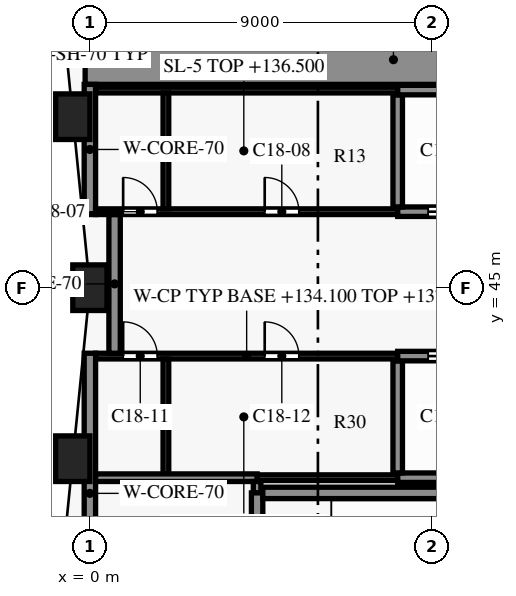
"""IFC4 building model, lengths in metres.
Left out: names, types, materials, properties, quantities, classifications, styles, units other than length and angle.
Written with IfcOpenShell. Run it as: python <this file> out.ifc"""

import sys

from ifc_helpers import new_model, si_unit, direction, frame, frame_2d, origin, origin_2d, place, context, subcontext, project, spatial, rectangle, extrude, element, fill, save


model = new_model("IFC4")
c1 = context("Model", 3, precision=1e-05, world=origin(), true_north=direction((0.0, 1.0)))
c2 = subcontext(c1, "Body", "Model", "MODEL_VIEW")
j1 = project(units=[si_unit("LENGTHUNIT", "METRE"), si_unit("PLANEANGLEUNIT", "RADIAN")], contexts=[c1])
p1 = place(None, origin())
s1 = spatial("IfcSite", under=j1, at=p1, CompositionType="ELEMENT")
p2 = place(p1, origin())
s2 = spatial("IfcBuilding", under=s1, at=p2, CompositionType="ELEMENT")
p3 = place(p2, frame((0.0, 0.0, 134.1)))
s3 = spatial("IfcBuildingStorey", under=s2, at=p3, CompositionType="ELEMENT", Elevation=134.1)
for number, where, z_axis, x_axis in (
    (1, (-0.45, 49.5, 0.0), (0.0, 0.0, 1.0), (0.1, -0.995, 0.0)),
    (2, (0.0, 45.0, 0.0), (0.0, 0.0, 1.0), (0.0, -1.0, 0.0)),
    (3, (-0.45, 40.5, 0.0), (0.0, 0.0, 1.0), (-0.1, -0.995, 0.0)),
):
    element("IfcColumn", number, at=place(p3, frame(where, z_axis=z_axis, x_axis=x_axis)), inside=s3, PredefinedType="COLUMN", context=c2, shape_type="SweptSolid", body=[
        extrude(rectangle(XDim=0.9, YDim=1.2, at=origin_2d()), origin(), (0.0, 0.0, 1.0), 3.8),
    ])
p4 = place(p3, frame((4.55, 39.6, 0.0), z_axis=(0.0, 0.0, 1.0), x_axis=(1.0, 0.0, 0.0)))
e4 = element("IfcWall", 4, at=p4, inside=s3, PredefinedType="SHEAR", context=c2, shape_type="SweptSolid", body=[
    extrude(rectangle(XDim=7.7, YDim=0.3, at=frame_2d((3.85, 0.0))), origin(), (0.0, 0.0, 1.0), 3.5),
])
p5 = place(p3, frame((4.4, 40.0, 0.0), z_axis=(0.0, 0.0, 1.0), x_axis=(1.0, 0.0, 0.0)))
e5 = element("IfcWall", 5, at=p5, inside=s3, PredefinedType="PARTITIONING", context=c2, shape_type="SweptSolid", body=[
    extrude(rectangle(XDim=3.7, YDim=0.15, at=frame_2d((1.85, 0.0))), origin(), (0.0, 0.0, 1.0), 3.35),
])
p6 = place(p3, frame((0.15, 40.0, 0.0), z_axis=(0.0, 0.0, 1.0), x_axis=(1.0, 0.0, 0.0)))
e6 = element("IfcWall", 6, at=p6, inside=s3, PredefinedType="PARTITIONING", context=c2, shape_type="SweptSolid", body=[
    extrude(rectangle(XDim=4.25, YDim=0.2, at=frame_2d((2.125, 0.0))), origin(), (0.0, 0.0, 1.0), 3.35),
])
p7 = place(p3, frame((8.1, 40.0, 0.0), z_axis=(0.0, 0.0, 1.0), x_axis=(1.0, 0.0, 0.0)))
e7 = element("IfcWall", 7, at=p7, inside=s3, PredefinedType="SHEAR", context=c2, shape_type="SweptSolid", body=[
    extrude(rectangle(XDim=13.5, YDim=0.25, at=frame_2d((6.75, 0.0))), origin(), (0.0, 0.0, 1.0), 3.5),
])
p8 = place(p3, frame((0.15, 43.2, 0.0), z_axis=(0.0, 0.0, 1.0), x_axis=(1.0, 0.0, 0.0)))
e8 = element("IfcWall", 8, at=p8, inside=s3, PredefinedType="PARTITIONING", context=c2, shape_type="SweptSolid", body=[
    extrude(rectangle(XDim=7.95, YDim=0.15, at=frame_2d((3.975, 0.0))), origin(), (0.0, 0.0, 1.0), 3.35),
])
p9 = place(p8, frame((0.725, 0.0, 0.0)))
e9 = element("IfcOpeningElement", 9, at=p9, cuts=e8, PredefinedType="OPENING", context=c2, shape_type="SweptSolid", body=[
    extrude(rectangle(XDim=0.9, YDim=2.1, at=frame_2d((0.45, 1.05))), frame((0.0, 0.085, 0.0), z_axis=(0.0, -1.0, 0.0), x_axis=(1.0, 0.0, 0.0)), (0.0, 0.0, 1.0), 0.17),
])
p10 = place(p8, frame((4.45, 0.0, 0.0)))
e10 = element("IfcOpeningElement", 10, at=p10, cuts=e8, PredefinedType="OPENING", context=c2, shape_type="SweptSolid", body=[
    extrude(rectangle(XDim=0.9, YDim=2.1, at=frame_2d((0.45, 1.05))), frame((0.0, 0.085, 0.0), z_axis=(0.0, -1.0, 0.0), x_axis=(1.0, 0.0, 0.0)), (0.0, 0.0, 1.0), 0.17),
])
p11 = place(p3, frame((8.1, 43.2, 0.0), z_axis=(0.0, 0.0, 1.0), x_axis=(1.0, 0.0, 0.0)))
e11 = element("IfcWall", 11, at=p11, inside=s3, PredefinedType="SHEAR", context=c2, shape_type="SweptSolid", body=[
    extrude(rectangle(XDim=13.5, YDim=0.25, at=frame_2d((6.75, 0.0))), origin(), (0.0, 0.0, 1.0), 3.5),
])
p12 = place(p11, frame((0.8, 0.0, 0.0)))
e12 = element("IfcOpeningElement", 12, at=p12, cuts=e11, PredefinedType="OPENING", context=c2, shape_type="SweptSolid", body=[
    extrude(rectangle(XDim=1.1, YDim=2.1, at=frame_2d((0.55, 1.05))), frame((0.0, 0.135, 0.0), z_axis=(0.0, -1.0, 0.0), x_axis=(1.0, 0.0, 0.0)), (0.0, 0.0, 1.0), 0.27),
])
p13 = place(p11, frame((3.5, 0.0, 0.0)))
e13 = element("IfcOpeningElement", 13, at=p13, cuts=e11, PredefinedType="OPENING", context=c2, shape_type="SweptSolid", body=[
    extrude(rectangle(XDim=1.1, YDim=2.1, at=frame_2d((0.55, 1.05))), frame((0.0, 0.135, 0.0), z_axis=(0.0, -1.0, 0.0), x_axis=(1.0, 0.0, 0.0)), (0.0, 0.0, 1.0), 0.27),
])
p14 = place(p11, frame((6.2, 0.0, 0.0)))
e14 = element("IfcOpeningElement", 14, at=p14, cuts=e11, PredefinedType="OPENING", context=c2, shape_type="SweptSolid", body=[
    extrude(rectangle(XDim=1.1, YDim=2.1, at=frame_2d((0.55, 1.05))), frame((0.0, 0.135, 0.0), z_axis=(0.0, -1.0, 0.0), x_axis=(1.0, 0.0, 0.0)), (0.0, 0.0, 1.0), 0.27),
])
p15 = place(p11, frame((8.9, 0.0, 0.0)))
e15 = element("IfcOpeningElement", 15, at=p15, cuts=e11, PredefinedType="OPENING", context=c2, shape_type="SweptSolid", body=[
    extrude(rectangle(XDim=1.1, YDim=2.1, at=frame_2d((0.55, 1.05))), frame((0.0, 0.135, 0.0), z_axis=(0.0, -1.0, 0.0), x_axis=(1.0, 0.0, 0.0)), (0.0, 0.0, 1.0), 0.27),
])
p16 = place(p11, frame((11.6, 0.0, 0.0)))
e16 = element("IfcOpeningElement", 16, at=p16, cuts=e11, PredefinedType="OPENING", context=c2, shape_type="SweptSolid", body=[
    extrude(rectangle(XDim=1.1, YDim=2.1, at=frame_2d((0.55, 1.05))), frame((0.0, 0.135, 0.0), z_axis=(0.0, -1.0, 0.0), x_axis=(1.0, 0.0, 0.0)), (0.0, 0.0, 1.0), 0.27),
])
p17 = place(p3, frame((0.15, 47.0, 0.0), z_axis=(0.0, 0.0, 1.0), x_axis=(1.0, 0.0, 0.0)))
e17 = element("IfcWall", 17, at=p17, inside=s3, PredefinedType="PARTITIONING", context=c2, shape_type="SweptSolid", body=[
    extrude(rectangle(XDim=7.95, YDim=0.15, at=frame_2d((3.975, 0.0))), origin(), (0.0, 0.0, 1.0), 3.35),
])
p18 = place(p17, frame((0.725, 0.0, 0.0)))
e18 = element("IfcOpeningElement", 18, at=p18, cuts=e17, PredefinedType="OPENING", context=c2, shape_type="SweptSolid", body=[
    extrude(rectangle(XDim=0.9, YDim=2.1, at=frame_2d((0.45, 1.05))), frame((0.0, 0.085, 0.0), z_axis=(0.0, -1.0, 0.0), x_axis=(1.0, 0.0, 0.0)), (0.0, 0.0, 1.0), 0.17),
])
p19 = place(p17, frame((4.45, 0.0, 0.0)))
e19 = element("IfcOpeningElement", 19, at=p19, cuts=e17, PredefinedType="OPENING", context=c2, shape_type="SweptSolid", body=[
    extrude(rectangle(XDim=0.9, YDim=2.1, at=frame_2d((0.45, 1.05))), frame((0.0, 0.085, 0.0), z_axis=(0.0, -1.0, 0.0), x_axis=(1.0, 0.0, 0.0)), (0.0, 0.0, 1.0), 0.17),
])
p20 = place(p3, frame((8.1, 47.0, 0.0), z_axis=(0.0, 0.0, 1.0), x_axis=(1.0, 0.0, 0.0)))
e20 = element("IfcWall", 20, at=p20, inside=s3, PredefinedType="SHEAR", context=c2, shape_type="SweptSolid", body=[
    extrude(rectangle(XDim=8.1, YDim=0.25, at=frame_2d((4.05, 0.0))), origin(), (0.0, 0.0, 1.0), 3.5),
])
p21 = place(p20, frame((0.8, 0.0, 0.0)))
e21 = element("IfcOpeningElement", 21, at=p21, cuts=e20, PredefinedType="OPENING", context=c2, shape_type="SweptSolid", body=[
    extrude(rectangle(XDim=1.1, YDim=2.1, at=frame_2d((0.55, 1.05))), frame((0.0, 0.135, 0.0), z_axis=(0.0, -1.0, 0.0), x_axis=(1.0, 0.0, 0.0)), (0.0, 0.0, 1.0), 0.27),
])
p22 = place(p20, frame((3.5, 0.0, 0.0)))
e22 = element("IfcOpeningElement", 22, at=p22, cuts=e20, PredefinedType="OPENING", context=c2, shape_type="SweptSolid", body=[
    extrude(rectangle(XDim=1.1, YDim=2.1, at=frame_2d((0.55, 1.05))), frame((0.0, 0.135, 0.0), z_axis=(0.0, -1.0, 0.0), x_axis=(1.0, 0.0, 0.0)), (0.0, 0.0, 1.0), 0.27),
])
p23 = place(p20, frame((6.2, 0.0, 0.0)))
e23 = element("IfcOpeningElement", 23, at=p23, cuts=e20, PredefinedType="OPENING", context=c2, shape_type="SweptSolid", body=[
    extrude(rectangle(XDim=1.1, YDim=2.1, at=frame_2d((0.55, 1.05))), frame((0.0, 0.135, 0.0), z_axis=(0.0, -1.0, 0.0), x_axis=(1.0, 0.0, 0.0)), (0.0, 0.0, 1.0), 0.27),
])
p24 = place(p3, frame((0.15, 50.2, 0.0), z_axis=(0.0, 0.0, 1.0), x_axis=(1.0, 0.0, 0.0)))
e24 = element("IfcWall", 24, at=p24, inside=s3, PredefinedType="PARTITIONING", context=c2, shape_type="SweptSolid", body=[
    extrude(rectangle(XDim=7.95, YDim=0.15, at=frame_2d((3.975, 0.0))), origin(), (0.0, 0.0, 1.0), 3.35),
])
p25 = place(p3, frame((8.1, 50.2, 0.0), z_axis=(0.0, 0.0, 1.0), x_axis=(1.0, 0.0, 0.0)))
e25 = element("IfcWall", 25, at=p25, inside=s3, PredefinedType="SHEAR", context=c2, shape_type="SweptSolid", body=[
    extrude(rectangle(XDim=7.975, YDim=0.25, at=frame_2d((3.987, 0.0))), origin(), (0.0, 0.0, 1.0), 3.5),
])
p26 = place(p3, frame((-0.125, 51.0, 0.0), z_axis=(0.0, 0.0, 1.0), x_axis=(1.0, 0.0, 0.0)))
e26 = element("IfcWall", 26, at=p26, inside=s3, PredefinedType="SHEAR", context=c2, shape_type="SweptSolid", body=[
    extrude(rectangle(XDim=16.225, YDim=1.3, at=frame_2d((8.113, 0.0))), origin(), (0.0, 0.0, 1.0), 3.5),
])
p27 = place(p3, frame((0.0, 35.9, 0.0), z_axis=(0.0, 0.0, 1.0), x_axis=(0.0, 1.0, 0.0)))
e27 = element("IfcWall", 27, at=p27, inside=s3, PredefinedType="SHEAR", context=c2, shape_type="SweptSolid", body=[
    extrude(rectangle(XDim=7.375, YDim=0.3, at=frame_2d((3.688, 0.0))), origin(), (0.0, 0.0, 1.0), 3.5),
])
p28 = place(p3, frame((0.0, 46.925, 0.0), z_axis=(0.0, 0.0, 1.0), x_axis=(0.0, 1.0, 0.0)))
e28 = element("IfcWall", 28, at=p28, inside=s3, PredefinedType="SHEAR", context=c2, shape_type="SweptSolid", body=[
    extrude(rectangle(XDim=3.425, YDim=0.3, at=frame_2d((1.712, 0.0))), origin(), (0.0, 0.0, 1.0), 3.5),
])
p29 = place(p3, frame((0.65, 43.275, 0.0), z_axis=(0.0, 0.0, 1.0), x_axis=(0.0, 1.0, 0.0)))
e29 = element("IfcWall", 29, at=p29, inside=s3, PredefinedType="SHEAR", context=c2, shape_type="SweptSolid", body=[
    extrude(rectangle(XDim=3.65, YDim=0.3, at=frame_2d((1.825, 0.0))), origin(), (0.0, 0.0, 1.0), 3.5),
])
p30 = place(p3, frame((2.0, 40.1, 0.0), z_axis=(0.0, 0.0, 1.0), x_axis=(0.0, 1.0, 0.0)))
e30 = element("IfcWall", 30, at=p30, inside=s3, PredefinedType="PARTITIONING", context=c2, shape_type="SweptSolid", body=[
    extrude(rectangle(XDim=3.025, YDim=0.15, at=frame_2d((1.512, 0.0))), origin(), (0.0, 0.0, 1.0), 3.35),
])
p31 = place(p3, frame((2.0, 47.075, 0.0), z_axis=(0.0, 0.0, 1.0), x_axis=(0.0, 1.0, 0.0)))
e31 = element("IfcWall", 31, at=p31, inside=s3, PredefinedType="PARTITIONING", context=c2, shape_type="SweptSolid", body=[
    extrude(rectangle(XDim=3.05, YDim=0.15, at=frame_2d((1.525, 0.0))), origin(), (0.0, 0.0, 1.0), 3.35),
])
p32 = place(p3, frame((4.4, 39.6, 0.0), z_axis=(0.0, 0.0, 1.0), x_axis=(0.0, 1.0, 0.0)))
e32 = element("IfcWall", 32, at=p32, inside=s3, PredefinedType="PARTITIONING", context=c2, shape_type="SweptSolid", body=[
    extrude(rectangle(XDim=0.3, YDim=0.2, at=frame_2d((0.15, 0.0))), origin(), (0.0, 0.0, 1.0), 3.35),
])
p33 = place(p3, frame((4.4, 36.15, 0.0), z_axis=(0.0, 0.0, 1.0), x_axis=(0.0, 1.0, 0.0)))
e33 = element("IfcWall", 33, at=p33, inside=s3, PredefinedType="SHEAR", context=c2, shape_type="SweptSolid", body=[
    extrude(rectangle(XDim=3.45, YDim=0.3, at=frame_2d((1.725, 0.0))), origin(), (0.0, 0.0, 1.0), 3.5),
])
for number, where, z_axis, x_axis in (
    (34, (8.1, 40.125, 0.0), (0.0, 0.0, 1.0), (0.0, 1.0, 0.0)),
    (35, (8.1, 47.125, 0.0), (0.0, 0.0, 1.0), (0.0, 1.0, 0.0)),
):
    element("IfcWall", number, at=place(p3, frame(where, z_axis=z_axis, x_axis=x_axis)), inside=s3, PredefinedType="SHEAR", context=c2, shape_type="SweptSolid", body=[
        extrude(rectangle(XDim=2.95, YDim=0.25, at=frame_2d((1.475, 0.0))), origin(), (0.0, 0.0, 1.0), 3.5),
    ])
p34 = place(p18, origin())
e36 = element("IfcDoor", 36, at=p34, inside=s3, OperationType="SINGLE_SWING_RIGHT", PredefinedType="DOOR", context=c2, shape_type="SweptSolid", body=[
    extrude(rectangle(XDim=0.9, YDim=2.1, at=frame_2d((0.45, 1.05))), frame((0.0, 0.025, 0.0), z_axis=(0.0, -1.0, 0.0), x_axis=(1.0, 0.0, 0.0)), (0.0, 0.0, 1.0), 0.05),
])
fill(e18, e36)
p35 = place(p19, origin())
e37 = element("IfcDoor", 37, at=p35, inside=s3, OperationType="SINGLE_SWING_LEFT", PredefinedType="DOOR", context=c2, shape_type="SweptSolid", body=[
    extrude(rectangle(XDim=0.9, YDim=2.1, at=frame_2d((0.45, 1.05))), frame((0.0, 0.025, 0.0), z_axis=(0.0, -1.0, 0.0), x_axis=(1.0, 0.0, 0.0)), (0.0, 0.0, 1.0), 0.05),
])
fill(e19, e37)
p36 = place(p9, origin())
e38 = element("IfcDoor", 38, at=p36, inside=s3, OperationType="SINGLE_SWING_LEFT", PredefinedType="DOOR", context=c2, shape_type="SweptSolid", body=[
    extrude(rectangle(XDim=0.9, YDim=2.1, at=frame_2d((0.45, 1.05))), frame((0.0, 0.025, 0.0), z_axis=(0.0, -1.0, 0.0), x_axis=(1.0, 0.0, 0.0)), (0.0, 0.0, 1.0), 0.05),
])
fill(e9, e38)
p37 = place(p10, origin())
e39 = element("IfcDoor", 39, at=p37, inside=s3, OperationType="SINGLE_SWING_RIGHT", PredefinedType="DOOR", context=c2, shape_type="SweptSolid", body=[
    extrude(rectangle(XDim=0.9, YDim=2.1, at=frame_2d((0.45, 1.05))), frame((0.0, 0.025, 0.0), z_axis=(0.0, -1.0, 0.0), x_axis=(1.0, 0.0, 0.0)), (0.0, 0.0, 1.0), 0.05),
])
fill(e10, e39)
p38 = place(p12, origin())
e40 = element("IfcDoor", 40, at=p38, inside=s3, OperationType="DOUBLE_DOOR_SLIDING", PredefinedType="DOOR", context=c2, shape_type="SweptSolid", body=[
    extrude(rectangle(XDim=1.1, YDim=2.1, at=frame_2d((0.55, 1.05))), frame((0.0, 0.025, 0.0), z_axis=(0.0, -1.0, 0.0), x_axis=(1.0, 0.0, 0.0)), (0.0, 0.0, 1.0), 0.05),
])
fill(e12, e40)
p39 = place(p21, origin())
e41 = element("IfcDoor", 41, at=p39, inside=s3, OperationType="DOUBLE_DOOR_SLIDING", PredefinedType="DOOR", context=c2, shape_type="SweptSolid", body=[
    extrude(rectangle(XDim=1.1, YDim=2.1, at=frame_2d((0.55, 1.05))), frame((0.0, 0.025, 0.0), z_axis=(0.0, -1.0, 0.0), x_axis=(1.0, 0.0, 0.0)), (0.0, 0.0, 1.0), 0.05),
])
fill(e21, e41)
save(model, sys.argv[1])
